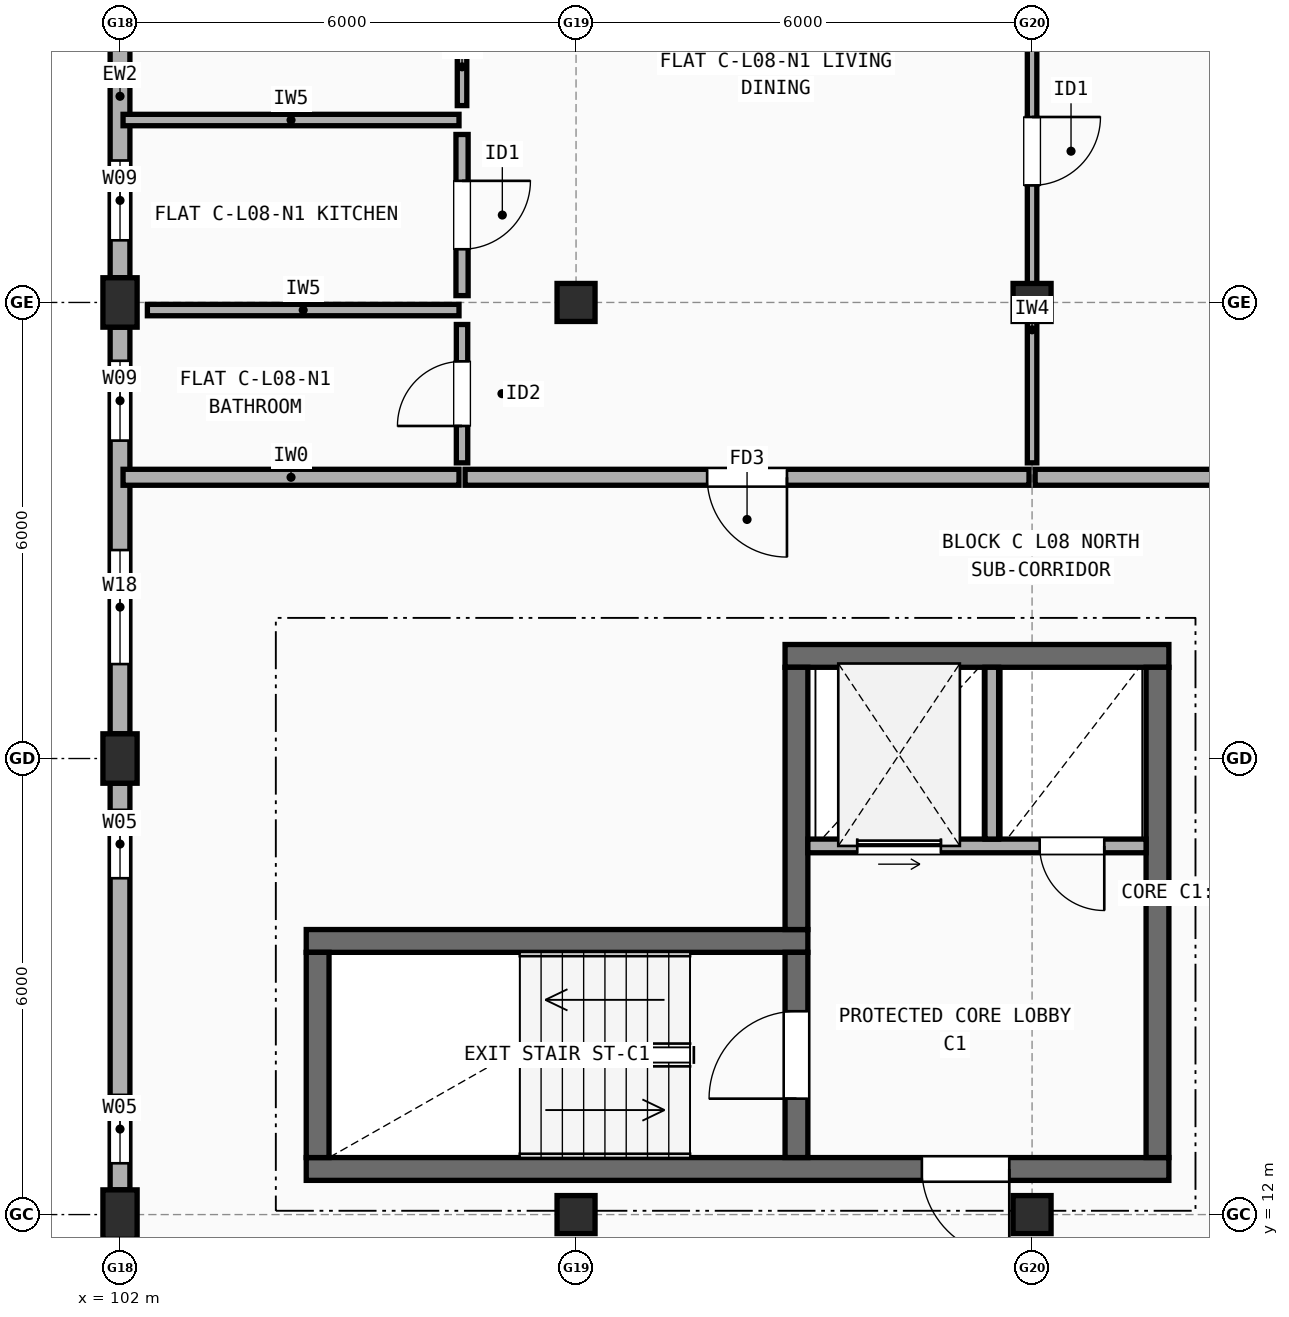
"""IFC4 building model, lengths in metres.
Left out: names, types, materials, properties, quantities, classifications, styles, units other than length and angle.
Written with IfcOpenShell. Run it as: python <this file> out.ifc"""

import sys

from ifc_helpers import new_model, si_unit, direction, frame, frame_2d, origin, origin_2d, place, context, subcontext, project, spatial, rectangle, extrude, element, fill, save


model = new_model("IFC4")
c1 = context("Model", 3, precision=1e-05, world=origin(), true_north=direction((0.0, 1.0)))
c2 = subcontext(c1, "Body", "Model", "MODEL_VIEW")
j1 = project(units=[si_unit("LENGTHUNIT", "METRE"), si_unit("PLANEANGLEUNIT", "RADIAN")], contexts=[c1])
p1 = place(None, origin())
s1 = spatial("IfcSite", under=j1, at=p1, CompositionType="ELEMENT")
p2 = place(p1, origin())
s2 = spatial("IfcBuilding", under=s1, at=p2, CompositionType="ELEMENT")
p3 = place(p2, frame((0.0, 0.0, 26.9)))
s3 = spatial("IfcBuildingStorey", under=s2, at=p3, CompositionType="ELEMENT", Elevation=26.9)
for number, where, z_axis, x_axis in (
    (1, (102.0, 12.0, 0.0), (0.0, 0.0, 1.0), (1.0, 0.0, 0.0)),
    (2, (102.0, 18.0, 0.0), (0.0, 0.0, 1.0), (1.0, 0.0, 0.0)),
    (3, (102.0, 24.0, 0.0), (0.0, 0.0, 1.0), (1.0, 0.0, 0.0)),
):
    element("IfcColumn", number, at=place(p3, frame(where, z_axis=z_axis, x_axis=x_axis)), inside=s3, PredefinedType="COLUMN", context=c2, shape_type="SweptSolid", body=[
        extrude(rectangle(XDim=0.45, YDim=0.65, at=origin_2d()), origin(), (0.0, 0.0, 1.0), 2.98),
    ])
for number, where, z_axis, x_axis in (
    (4, (108.0, 12.0, 0.0), (0.0, 0.0, 1.0), (1.0, 0.0, 0.0)),
    (5, (108.0, 24.0, 0.0), (0.0, 0.0, 1.0), (1.0, 0.0, 0.0)),
    (6, (114.0, 12.0, 0.0), (0.0, 0.0, 1.0), (1.0, 0.0, 0.0)),
    (7, (114.0, 24.0, 0.0), (0.0, 0.0, 1.0), (1.0, 0.0, 0.0)),
):
    element("IfcColumn", number, at=place(p3, frame(where, z_axis=z_axis, x_axis=x_axis)), inside=s3, PredefinedType="COLUMN", context=c2, shape_type="SweptSolid", body=[
        extrude(rectangle(XDim=0.5, YDim=0.5, at=origin_2d()), origin(), (0.0, 0.0, 1.0), 2.98),
    ])
p4 = place(p3, frame((102.0, 29.675, 0.0), z_axis=(0.0, 0.0, 1.0), x_axis=(0.0, -1.0, 0.0)))
e8 = element("IfcWall", 8, at=p4, inside=s3, PredefinedType="STANDARD", context=c2, shape_type="SweptSolid", body=[
    extrude(rectangle(XDim=5.35, YDim=0.26, at=frame_2d((2.675, 0.0))), origin(), (0.0, 0.0, 1.0), 2.462),
])
p5 = place(p4, frame((1.117, 0.0, 0.9)))
e9 = element("IfcOpeningElement", 9, at=p5, cuts=e8, PredefinedType="OPENING", context=c2, shape_type="SweptSolid", body=[
    extrude(rectangle(XDim=1.0, YDim=1.4, at=frame_2d((0.5, 0.7))), frame((0.0, 0.14, 0.0), z_axis=(0.0, -1.0, 0.0), x_axis=(1.0, 0.0, 0.0)), (0.0, 0.0, 1.0), 0.28),
])
p6 = place(p4, frame((3.808, 0.0, 0.9)))
e10 = element("IfcOpeningElement", 10, at=p6, cuts=e8, PredefinedType="OPENING", context=c2, shape_type="SweptSolid", body=[
    extrude(rectangle(XDim=1.05, YDim=1.35, at=frame_2d((0.525, 0.675))), frame((0.0, 0.14, 0.0), z_axis=(0.0, -1.0, 0.0), x_axis=(1.0, 0.0, 0.0)), (0.0, 0.0, 1.0), 0.28),
])
p7 = place(p3, frame((102.0, 23.675, 0.0), z_axis=(0.0, 0.0, 1.0), x_axis=(0.0, -1.0, 0.0)))
e11 = element("IfcWall", 11, at=p7, inside=s3, PredefinedType="STANDARD", context=c2, shape_type="SweptSolid", body=[
    extrude(rectangle(XDim=5.35, YDim=0.26, at=frame_2d((2.675, 0.0))), origin(), (0.0, 0.0, 1.0), 2.462),
])
p8 = place(p7, frame((0.442, 0.0, 0.9)))
e12 = element("IfcOpeningElement", 12, at=p8, cuts=e11, PredefinedType="OPENING", context=c2, shape_type="SweptSolid", body=[
    extrude(rectangle(XDim=1.05, YDim=1.35, at=frame_2d((0.525, 0.675))), frame((0.0, 0.14, 0.0), z_axis=(0.0, -1.0, 0.0), x_axis=(1.0, 0.0, 0.0)), (0.0, 0.0, 1.0), 0.28),
])
p9 = place(p7, frame((2.933, 0.0, 0.9)))
e13 = element("IfcOpeningElement", 13, at=p9, cuts=e11, PredefinedType="OPENING", context=c2, shape_type="SweptSolid", body=[
    extrude(rectangle(XDim=1.5, YDim=1.4, at=frame_2d((0.75, 0.7))), frame((0.0, 0.14, 0.0), z_axis=(0.0, -1.0, 0.0), x_axis=(1.0, 0.0, 0.0)), (0.0, 0.0, 1.0), 0.28),
])
p10 = place(p3, frame((102.0, 17.675, 0.0), z_axis=(0.0, 0.0, 1.0), x_axis=(0.0, -1.0, 0.0)))
e14 = element("IfcWall", 14, at=p10, inside=s3, PredefinedType="STANDARD", context=c2, shape_type="SweptSolid", body=[
    extrude(rectangle(XDim=5.35, YDim=0.26, at=frame_2d((2.675, 0.0))), origin(), (0.0, 0.0, 1.0), 2.462),
])
p11 = place(p10, frame((0.35, 0.0, 0.9)))
e15 = element("IfcOpeningElement", 15, at=p11, cuts=e14, PredefinedType="OPENING", context=c2, shape_type="SweptSolid", body=[
    extrude(rectangle(XDim=0.9, YDim=1.4, at=frame_2d((0.45, 0.7))), frame((0.0, 0.14, 0.0), z_axis=(0.0, -1.0, 0.0), x_axis=(1.0, 0.0, 0.0)), (0.0, 0.0, 1.0), 0.28),
])
p12 = place(p10, frame((4.1, 0.0, 0.9)))
e16 = element("IfcOpeningElement", 16, at=p12, cuts=e14, PredefinedType="OPENING", context=c2, shape_type="SweptSolid", body=[
    extrude(rectangle(XDim=0.9, YDim=1.4, at=frame_2d((0.45, 0.7))), frame((0.0, 0.14, 0.0), z_axis=(0.0, -1.0, 0.0), x_axis=(1.0, 0.0, 0.0)), (0.0, 0.0, 1.0), 0.28),
])
p13 = place(p3, frame((104.45, 12.6, 0.0), z_axis=(0.0, 0.0, 1.0), x_axis=(1.0, 0.0, 0.0)))
e17 = element("IfcWall", 17, at=p13, inside=s3, PredefinedType="SHEAR", context=c2, shape_type="SweptSolid", body=[
    extrude(rectangle(XDim=11.35, YDim=0.3, at=frame_2d((5.675, 0.0))), origin(), (0.0, 0.0, 1.0), 2.98),
])
p14 = place(p13, frame((8.1, 0.0, 0.0)))
e18 = element("IfcOpeningElement", 18, at=p14, cuts=e17, PredefinedType="OPENING", context=c2, shape_type="SweptSolid", body=[
    extrude(rectangle(XDim=1.15, YDim=2.15, at=frame_2d((0.575, 1.075))), frame((0.0, 0.16, 0.0), z_axis=(0.0, -1.0, 0.0), x_axis=(1.0, 0.0, 0.0)), (0.0, 0.0, 1.0), 0.32),
])
p15 = place(p3, frame((111.05, 15.6, 0.0), z_axis=(0.0, 0.0, 1.0), x_axis=(-1.0, 0.0, 0.0)))
e19 = element("IfcWall", 19, at=p15, inside=s3, PredefinedType="SHEAR", context=c2, shape_type="SweptSolid", body=[
    extrude(rectangle(XDim=6.6, YDim=0.3, at=frame_2d((3.3, 0.0))), origin(), (0.0, 0.0, 1.0), 2.98),
])
p16 = place(p3, frame((104.6, 15.45, 0.0), z_axis=(0.0, 0.0, 1.0), x_axis=(0.0, -1.0, 0.0)))
e20 = element("IfcWall", 20, at=p16, inside=s3, PredefinedType="SHEAR", context=c2, shape_type="SweptSolid", body=[
    extrude(rectangle(XDim=2.7, YDim=0.3, at=frame_2d((1.35, 0.0))), origin(), (0.0, 0.0, 1.0), 2.98),
])
p17 = place(p3, frame((110.9, 12.75, 0.0), z_axis=(0.0, 0.0, 1.0), x_axis=(0.0, 1.0, 0.0)))
e21 = element("IfcWall", 21, at=p17, inside=s3, PredefinedType="SHEAR", context=c2, shape_type="SweptSolid", body=[
    extrude(rectangle(XDim=2.7, YDim=0.3, at=frame_2d((1.35, 0.0))), origin(), (0.0, 0.0, 1.0), 2.98),
])
p18 = place(p17, frame((0.775, 0.0, 0.0)))
e22 = element("IfcOpeningElement", 22, at=p18, cuts=e21, PredefinedType="OPENING", context=c2, shape_type="SweptSolid", body=[
    extrude(rectangle(XDim=1.15, YDim=2.15, at=frame_2d((0.575, 1.075))), frame((0.0, 0.16, 0.0), z_axis=(0.0, -1.0, 0.0), x_axis=(1.0, 0.0, 0.0)), (0.0, 0.0, 1.0), 0.32),
])
p19 = place(p3, frame((115.8, 19.35, 0.0), z_axis=(0.0, 0.0, 1.0), x_axis=(-1.0, 0.0, 0.0)))
e23 = element("IfcWall", 23, at=p19, inside=s3, PredefinedType="SHEAR", context=c2, shape_type="SweptSolid", body=[
    extrude(rectangle(XDim=5.05, YDim=0.3, at=frame_2d((2.525, 0.0))), origin(), (0.0, 0.0, 1.0), 2.98),
])
p20 = place(p3, frame((115.65, 12.75, 0.0), z_axis=(0.0, 0.0, 1.0), x_axis=(0.0, 1.0, 0.0)))
e24 = element("IfcWall", 24, at=p20, inside=s3, PredefinedType="SHEAR", context=c2, shape_type="SweptSolid", body=[
    extrude(rectangle(XDim=6.45, YDim=0.3, at=frame_2d((3.225, 0.0))), origin(), (0.0, 0.0, 1.0), 2.98),
])
p21 = place(p3, frame((110.9, 15.75, 0.0), z_axis=(0.0, 0.0, 1.0), x_axis=(0.0, 1.0, 0.0)))
e25 = element("IfcWall", 25, at=p21, inside=s3, PredefinedType="SHEAR", context=c2, shape_type="SweptSolid", body=[
    extrude(rectangle(XDim=3.45, YDim=0.3, at=frame_2d((1.725, 0.0))), origin(), (0.0, 0.0, 1.0), 2.98),
])
p22 = place(p3, frame((111.05, 16.85, 0.0), z_axis=(0.0, 0.0, 1.0), x_axis=(1.0, 0.0, 0.0)))
e26 = element("IfcWall", 26, at=p22, inside=s3, PredefinedType="SOLIDWALL", context=c2, shape_type="SweptSolid", body=[
    extrude(rectangle(XDim=4.45, YDim=0.18, at=frame_2d((2.225, 0.0))), origin(), (0.0, 0.0, 1.0), 2.98),
])
p23 = place(p22, frame((0.65, 0.0, 0.0)))
e27 = element("IfcOpeningElement", 27, at=p23, cuts=e26, PredefinedType="OPENING", context=c2, shape_type="SweptSolid", body=[
    extrude(rectangle(XDim=1.1, YDim=2.15, at=frame_2d((0.55, 1.075))), frame((0.0, 0.1, 0.0), z_axis=(0.0, -1.0, 0.0), x_axis=(1.0, 0.0, 0.0)), (0.0, 0.0, 1.0), 0.2),
])
p24 = place(p22, frame((3.05, 0.0, 0.0)))
e28 = element("IfcOpeningElement", 28, at=p24, cuts=e26, PredefinedType="OPENING", context=c2, shape_type="SweptSolid", body=[
    extrude(rectangle(XDim=0.85, YDim=2.1, at=frame_2d((0.425, 1.05))), frame((0.0, 0.1, 0.0), z_axis=(0.0, -1.0, 0.0), x_axis=(1.0, 0.0, 0.0)), (0.0, 0.0, 1.0), 0.2),
])
p25 = place(p3, frame((113.47, 16.94, 0.0), z_axis=(0.0, 0.0, 1.0), x_axis=(0.0, 1.0, 0.0)))
e29 = element("IfcWall", 29, at=p25, inside=s3, PredefinedType="SOLIDWALL", context=c2, shape_type="SweptSolid", body=[
    extrude(rectangle(XDim=2.26, YDim=0.18, at=frame_2d((1.13, 0.0))), origin(), (0.0, 0.0, 1.0), 2.98),
])
p26 = place(p3, frame((102.04, 21.7, 0.0), z_axis=(0.0, 0.0, 1.0), x_axis=(1.0, 0.0, 0.0)))
e30 = element("IfcWall", 30, at=p26, inside=s3, PredefinedType="SOLIDWALL", context=c2, shape_type="SweptSolid", body=[
    extrude(rectangle(XDim=4.42, YDim=0.21, at=frame_2d((2.21, 0.0))), origin(), (0.0, 0.0, 1.0), 2.462),
])
p27 = place(p3, frame((106.54, 21.7, 0.0), z_axis=(0.0, 0.0, 1.0), x_axis=(1.0, 0.0, 0.0)))
e31 = element("IfcWall", 31, at=p27, inside=s3, PredefinedType="SOLIDWALL", context=c2, shape_type="SweptSolid", body=[
    extrude(rectangle(XDim=7.42, YDim=0.21, at=frame_2d((3.71, 0.0))), origin(), (0.0, 0.0, 1.0), 2.508),
])
p28 = place(p27, frame((3.185, 0.0, 0.0)))
e32 = element("IfcOpeningElement", 32, at=p28, cuts=e31, PredefinedType="OPENING", context=c2, shape_type="SweptSolid", body=[
    extrude(rectangle(XDim=1.05, YDim=2.15, at=frame_2d((0.525, 1.075))), frame((0.0, 0.115, 0.0), z_axis=(0.0, -1.0, 0.0), x_axis=(1.0, 0.0, 0.0)), (0.0, 0.0, 1.0), 0.23),
])
p29 = place(p3, frame((106.5, 26.59, 0.0), z_axis=(0.0, 0.0, 1.0), x_axis=(0.0, 1.0, 0.0)))
e33 = element("IfcWall", 33, at=p29, inside=s3, PredefinedType="PARTITIONING", context=c2, shape_type="SweptSolid", body=[
    extrude(rectangle(XDim=3.22, YDim=0.125, at=frame_2d((1.61, 0.0))), origin(), (0.0, 0.0, 1.0), 2.98),
])
p30 = place(p29, frame((1.17, 0.0, 0.0)))
e34 = element("IfcOpeningElement", 34, at=p30, cuts=e33, PredefinedType="OPENING", context=c2, shape_type="SweptSolid", body=[
    extrude(rectangle(XDim=0.88, YDim=2.1, at=frame_2d((0.44, 1.05))), frame((0.0, 0.073, 0.0), z_axis=(0.0, -1.0, 0.0), x_axis=(1.0, 0.0, 0.0)), (0.0, 0.0, 1.0), 0.145),
])
p31 = place(p3, frame((106.5, 24.09, 0.0), z_axis=(0.0, 0.0, 1.0), x_axis=(0.0, 1.0, 0.0)))
e35 = element("IfcWall", 35, at=p31, inside=s3, PredefinedType="PLUMBINGWALL", context=c2, shape_type="SweptSolid", body=[
    extrude(rectangle(XDim=2.12, YDim=0.16, at=frame_2d((1.06, 0.0))), origin(), (0.0, 0.0, 1.0), 2.98),
])
p32 = place(p31, frame((0.61, 0.0, 0.0)))
e36 = element("IfcOpeningElement", 36, at=p32, cuts=e35, PredefinedType="OPENING", context=c2, shape_type="SweptSolid", body=[
    extrude(rectangle(XDim=0.9, YDim=2.1, at=frame_2d((0.45, 1.05))), frame((0.0, 0.09, 0.0), z_axis=(0.0, -1.0, 0.0), x_axis=(1.0, 0.0, 0.0)), (0.0, 0.0, 1.0), 0.18),
])
p33 = place(p3, frame((106.5, 21.89, 0.0), z_axis=(0.0, 0.0, 1.0), x_axis=(0.0, 1.0, 0.0)))
e37 = element("IfcWall", 37, at=p33, inside=s3, PredefinedType="PARTITIONING", context=c2, shape_type="SweptSolid", body=[
    extrude(rectangle(XDim=1.82, YDim=0.15, at=frame_2d((0.91, 0.0))), origin(), (0.0, 0.0, 1.0), 2.98),
])
p34 = place(p33, frame((0.485, 0.0, 0.0)))
e38 = element("IfcOpeningElement", 38, at=p34, cuts=e37, PredefinedType="OPENING", context=c2, shape_type="SweptSolid", body=[
    extrude(rectangle(XDim=0.85, YDim=2.1, at=frame_2d((0.425, 1.05))), frame((0.0, 0.085, 0.0), z_axis=(0.0, -1.0, 0.0), x_axis=(1.0, 0.0, 0.0)), (0.0, 0.0, 1.0), 0.17),
])
p35 = place(p3, frame((102.04, 26.4, 0.0), z_axis=(0.0, 0.0, 1.0), x_axis=(1.0, 0.0, 0.0)))
e39 = element("IfcWall", 39, at=p35, inside=s3, PredefinedType="PARTITIONING", context=c2, shape_type="SweptSolid", body=[
    extrude(rectangle(XDim=4.42, YDim=0.15, at=frame_2d((2.21, 0.0))), origin(), (0.0, 0.0, 1.0), 2.462),
])
p36 = place(p3, frame((102.36, 23.9, 0.0), z_axis=(0.0, 0.0, 1.0), x_axis=(1.0, 0.0, 0.0)))
e40 = element("IfcWall", 40, at=p36, inside=s3, PredefinedType="PARTITIONING", context=c2, shape_type="SweptSolid", body=[
    extrude(rectangle(XDim=4.1, YDim=0.15, at=frame_2d((2.05, 0.0))), origin(), (0.0, 0.0, 1.0), 2.508),
])
p37 = place(p3, frame((114.04, 21.7, 0.0), z_axis=(0.0, 0.0, 1.0), x_axis=(1.0, 0.0, 0.0)))
e41 = element("IfcWall", 41, at=p37, inside=s3, PredefinedType="SOLIDWALL", context=c2, shape_type="SweptSolid", body=[
    extrude(rectangle(XDim=2.92, YDim=0.21, at=frame_2d((1.46, 0.0))), origin(), (0.0, 0.0, 1.0), 2.508),
])
p38 = place(p3, frame((114.0, 21.89, 0.0), z_axis=(0.0, 0.0, 1.0), x_axis=(0.0, 1.0, 0.0)))
e42 = element("IfcWall", 42, at=p38, inside=s3, PredefinedType="PARTITIONING", context=c2, shape_type="SweptSolid", body=[
    extrude(rectangle(XDim=7.6, YDim=0.125, at=frame_2d((3.8, 0.0))), origin(), (0.0, 0.0, 1.0), 2.458),
])
p39 = place(p38, frame((3.65, 0.0, 0.0)))
e43 = element("IfcOpeningElement", 43, at=p39, cuts=e42, PredefinedType="OPENING", context=c2, shape_type="SweptSolid", body=[
    extrude(rectangle(XDim=0.9, YDim=2.1, at=frame_2d((0.45, 1.05))), frame((0.0, 0.073, 0.0), z_axis=(0.0, -1.0, 0.0), x_axis=(1.0, 0.0, 0.0)), (0.0, 0.0, 1.0), 0.145),
])
p40 = place(p6, origin())
e44 = element("IfcWindow", 44, at=p40, inside=s3, PartitioningType="SINGLE_PANEL", PredefinedType="WINDOW", context=c2, shape_type="SweptSolid", body=[
    extrude(rectangle(XDim=1.05, YDim=1.35, at=frame_2d((0.525, 0.675))), frame((0.0, 0.03, 0.0), z_axis=(0.0, -1.0, 0.0), x_axis=(1.0, 0.0, 0.0)), (0.0, 0.0, 1.0), 0.06),
])
fill(e10, e44)
p41 = place(p8, origin())
e45 = element("IfcWindow", 45, at=p41, inside=s3, PartitioningType="SINGLE_PANEL", PredefinedType="WINDOW", context=c2, shape_type="SweptSolid", body=[
    extrude(rectangle(XDim=1.05, YDim=1.35, at=frame_2d((0.525, 0.675))), frame((0.0, 0.03, 0.0), z_axis=(0.0, -1.0, 0.0), x_axis=(1.0, 0.0, 0.0)), (0.0, 0.0, 1.0), 0.06),
])
fill(e12, e45)
p42 = place(p9, origin())
e46 = element("IfcWindow", 46, at=p42, inside=s3, PartitioningType="SINGLE_PANEL", PredefinedType="WINDOW", context=c2, shape_type="SweptSolid", body=[
    extrude(rectangle(XDim=1.5, YDim=1.4, at=frame_2d((0.75, 0.7))), frame((0.0, 0.03, 0.0), z_axis=(0.0, -1.0, 0.0), x_axis=(1.0, 0.0, 0.0)), (0.0, 0.0, 1.0), 0.06),
])
fill(e13, e46)
p43 = place(p11, origin())
e47 = element("IfcWindow", 47, at=p43, inside=s3, PartitioningType="SINGLE_PANEL", PredefinedType="WINDOW", context=c2, shape_type="SweptSolid", body=[
    extrude(rectangle(XDim=0.9, YDim=1.4, at=frame_2d((0.45, 0.7))), frame((0.0, 0.03, 0.0), z_axis=(0.0, -1.0, 0.0), x_axis=(1.0, 0.0, 0.0)), (0.0, 0.0, 1.0), 0.06),
])
fill(e15, e47)
p44 = place(p12, origin())
e48 = element("IfcWindow", 48, at=p44, inside=s3, PartitioningType="SINGLE_PANEL", PredefinedType="WINDOW", context=c2, shape_type="SweptSolid", body=[
    extrude(rectangle(XDim=0.9, YDim=1.4, at=frame_2d((0.45, 0.7))), frame((0.0, 0.03, 0.0), z_axis=(0.0, -1.0, 0.0), x_axis=(1.0, 0.0, 0.0)), (0.0, 0.0, 1.0), 0.06),
])
fill(e16, e48)
p45 = place(p14, origin())
e49 = element("IfcDoor", 49, at=p45, inside=s3, OperationType="SINGLE_SWING_RIGHT", PredefinedType="DOOR", context=c2, shape_type="SweptSolid", body=[
    extrude(rectangle(XDim=1.15, YDim=2.15, at=frame_2d((0.575, 1.075))), frame((0.0, 0.025, 0.0), z_axis=(0.0, -1.0, 0.0), x_axis=(1.0, 0.0, 0.0)), (0.0, 0.0, 1.0), 0.05),
])
fill(e18, e49)
p46 = place(p18, origin())
e50 = element("IfcDoor", 50, at=p46, inside=s3, OperationType="SINGLE_SWING_LEFT", PredefinedType="DOOR", context=c2, shape_type="SweptSolid", body=[
    extrude(rectangle(XDim=1.15, YDim=2.15, at=frame_2d((0.575, 1.075))), frame((0.0, 0.025, 0.0), z_axis=(0.0, -1.0, 0.0), x_axis=(1.0, 0.0, 0.0)), (0.0, 0.0, 1.0), 0.05),
])
fill(e22, e50)
p47 = place(p23, origin())
e51 = element("IfcDoor", 51, at=p47, inside=s3, OperationType="SLIDING_TO_LEFT", PredefinedType="DOOR", context=c2, shape_type="SweptSolid", body=[
    extrude(rectangle(XDim=1.1, YDim=2.15, at=frame_2d((0.55, 1.075))), frame((0.0, 0.025, 0.0), z_axis=(0.0, -1.0, 0.0), x_axis=(1.0, 0.0, 0.0)), (0.0, 0.0, 1.0), 0.05),
])
fill(e27, e51)
p48 = place(p24, frame((0.85, 0.0, 0.0), z_axis=(0.0, 0.0, 1.0), x_axis=(-1.0, 0.0, 0.0)))
e52 = element("IfcDoor", 52, at=p48, inside=s3, OperationType="SINGLE_SWING_RIGHT", PredefinedType="DOOR", context=c2, shape_type="SweptSolid", body=[
    extrude(rectangle(XDim=0.85, YDim=2.1, at=frame_2d((0.425, 1.05))), frame((0.0, 0.025, 0.0), z_axis=(0.0, -1.0, 0.0), x_axis=(1.0, 0.0, 0.0)), (0.0, 0.0, 1.0), 0.05),
])
fill(e28, e52)
p49 = place(p28, origin())
e53 = element("IfcDoor", 53, at=p49, inside=s3, OperationType="SINGLE_SWING_RIGHT", PredefinedType="DOOR", context=c2, shape_type="SweptSolid", body=[
    extrude(rectangle(XDim=1.05, YDim=2.15, at=frame_2d((0.525, 1.075))), frame((0.0, 0.025, 0.0), z_axis=(0.0, -1.0, 0.0), x_axis=(1.0, 0.0, 0.0)), (0.0, 0.0, 1.0), 0.05),
])
fill(e32, e53)
p50 = place(p32, origin())
e54 = element("IfcDoor", 54, at=p50, inside=s3, OperationType="SINGLE_SWING_RIGHT", PredefinedType="DOOR", context=c2, shape_type="SweptSolid", body=[
    extrude(rectangle(XDim=0.9, YDim=2.1, at=frame_2d((0.45, 1.05))), frame((0.0, 0.025, 0.0), z_axis=(0.0, -1.0, 0.0), x_axis=(1.0, 0.0, 0.0)), (0.0, 0.0, 1.0), 0.05),
])
fill(e36, e54)
p51 = place(p34, origin())
e55 = element("IfcDoor", 55, at=p51, inside=s3, OperationType="SINGLE_SWING_LEFT", PredefinedType="DOOR", context=c2, shape_type="SweptSolid", body=[
    extrude(rectangle(XDim=0.85, YDim=2.1, at=frame_2d((0.425, 1.05))), frame((0.0, 0.025, 0.0), z_axis=(0.0, -1.0, 0.0), x_axis=(1.0, 0.0, 0.0)), (0.0, 0.0, 1.0), 0.05),
])
fill(e38, e55)
p52 = place(p39, origin())
e56 = element("IfcDoor", 56, at=p52, inside=s3, OperationType="SINGLE_SWING_RIGHT", PredefinedType="DOOR", context=c2, shape_type="SweptSolid", body=[
    extrude(rectangle(XDim=0.9, YDim=2.1, at=frame_2d((0.45, 1.05))), frame((0.0, 0.025, 0.0), z_axis=(0.0, -1.0, 0.0), x_axis=(1.0, 0.0, 0.0)), (0.0, 0.0, 1.0), 0.05),
])
fill(e43, e56)
save(model, sys.argv[1])
